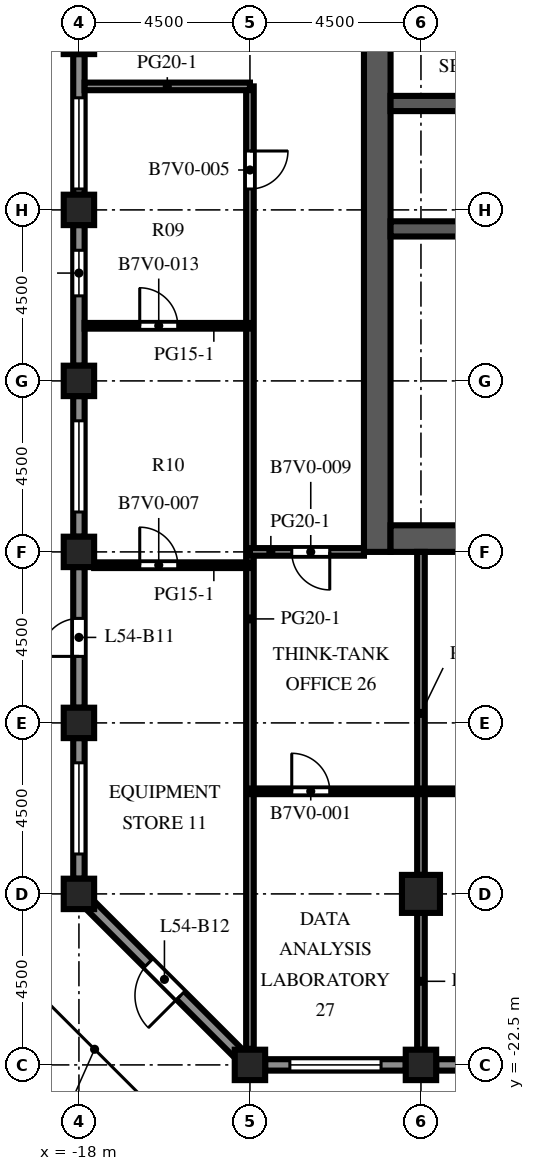
"""IFC4 building model, lengths in metres.
Left out: names, types, materials, properties, quantities, classifications, styles, units other than length and angle.
Written with IfcOpenShell. Run it as: python <this file> out.ifc"""

import sys

from ifc_helpers import new_model, si_unit, direction, frame, frame_2d, origin, origin_2d, place, context, subcontext, project, spatial, rectangle, extrude, element, fill, save


model = new_model("IFC4")
c1 = context("Model", 3, precision=1e-05, world=origin(), true_north=direction((0.0, 1.0)))
c2 = subcontext(c1, "Body", "Model", "MODEL_VIEW")
j1 = project(units=[si_unit("LENGTHUNIT", "METRE"), si_unit("PLANEANGLEUNIT", "RADIAN")], contexts=[c1])
p1 = place(None, origin())
s1 = spatial("IfcSite", under=j1, at=p1, CompositionType="ELEMENT")
p2 = place(p1, origin())
s2 = spatial("IfcBuilding", under=s1, at=p2, CompositionType="ELEMENT")
p3 = place(p2, frame((0.0, 0.0, 239.8)))
s3 = spatial("IfcBuildingStorey", under=s2, at=p3, CompositionType="ELEMENT", Elevation=239.8)
for number, where, z_axis, x_axis in (
    (1, (-18.0, -18.0, 0.0), (0.0, 0.0, 1.0), (1.0, 0.0, 0.0)),
    (2, (-18.0, -13.5, 0.0), (0.0, 0.0, 1.0), (1.0, 0.0, 0.0)),
    (3, (-18.0, -9.0, 0.0), (0.0, 0.0, 1.0), (1.0, 0.0, 0.0)),
    (4, (-18.0, -4.5, 0.0), (0.0, 0.0, 1.0), (1.0, 0.0, 0.0)),
    (5, (-18.0, 0.0, 0.0), (0.0, 0.0, 1.0), (1.0, 0.0, 0.0)),
    (6, (-18.0, 4.5, 0.0), (0.0, 0.0, 1.0), (1.0, 0.0, 0.0)),
    (7, (-13.5, -22.5, 0.0), (0.0, 0.0, 1.0), (1.0, 0.0, 0.0)),
    (8, (-9.0, -22.5, 0.0), (0.0, 0.0, 1.0), (1.0, 0.0, 0.0)),
):
    element("IfcColumn", number, at=place(p3, frame(where, z_axis=z_axis, x_axis=x_axis)), inside=s3, PredefinedType="COLUMN", context=c2, shape_type="SweptSolid", body=[
        extrude(rectangle(XDim=0.8, YDim=0.8, at=origin_2d()), origin(), (0.0, 0.0, 1.0), 4.1),
    ])
p4 = place(p3, frame((-9.0, -18.0, 0.0), z_axis=(0.0, 0.0, 1.0), x_axis=(1.0, 0.0, 0.0)))
e9 = element("IfcColumn", 9, at=p4, inside=s3, PredefinedType="COLUMN", context=c2, shape_type="SweptSolid", body=[
    extrude(rectangle(XDim=1.0, YDim=1.0, at=origin_2d()), origin(), (0.0, 0.0, 1.0), 4.1),
])
p5 = place(p3, frame((-10.15, -9.0, 0.0), z_axis=(0.0, 0.0, 1.0), x_axis=(0.0, 1.0, 0.0)))
e10 = element("IfcWall", 10, at=p5, inside=s3, PredefinedType="SHEAR", context=c2, shape_type="SweptSolid", body=[
    extrude(rectangle(XDim=27.5, YDim=0.7, at=frame_2d((13.75, 0.0))), origin(), (0.0, 0.0, 1.0), 4.1),
])
p6 = place(p5, frame((12.55, 0.0, 0.0)))
e11 = element("IfcOpeningElement", 11, at=p6, cuts=e10, PredefinedType="OPENING", context=c2, shape_type="SweptSolid", body=[
    extrude(rectangle(XDim=2.4, YDim=2.4, at=frame_2d((1.2, 1.2))), frame((0.0, 0.36, 0.0), z_axis=(0.0, -1.0, 0.0), x_axis=(1.0, 0.0, 0.0)), (0.0, 0.0, 1.0), 0.72),
])
p7 = place(p5, frame((6.825, 0.0, 0.0)))
e12 = element("IfcOpeningElement", 12, at=p7, cuts=e10, PredefinedType="OPENING", context=c2, shape_type="SweptSolid", body=[
    extrude(rectangle(XDim=1.2, YDim=2.1, at=frame_2d((0.6, 1.05))), frame((0.0, 0.36, 0.0), z_axis=(0.0, -1.0, 0.0), x_axis=(1.0, 0.0, 0.0)), (0.0, 0.0, 1.0), 0.72),
])
p8 = place(p5, frame((19.475, 0.0, 0.0)))
e13 = element("IfcOpeningElement", 13, at=p8, cuts=e10, PredefinedType="OPENING", context=c2, shape_type="SweptSolid", body=[
    extrude(rectangle(XDim=1.2, YDim=2.1, at=frame_2d((0.6, 1.05))), frame((0.0, 0.36, 0.0), z_axis=(0.0, -1.0, 0.0), x_axis=(1.0, 0.0, 0.0)), (0.0, 0.0, 1.0), 0.72),
])
p9 = place(p3, frame((-9.8, -8.65, 0.0), z_axis=(0.0, 0.0, 1.0), x_axis=(1.0, 0.0, 0.0)))
e14 = element("IfcWall", 14, at=p9, inside=s3, PredefinedType="SHEAR", context=c2, shape_type="SweptSolid", body=[
    extrude(rectangle(XDim=10.6, YDim=0.7, at=frame_2d((5.3, 0.0))), origin(), (0.0, 0.0, 1.0), 4.1),
])
p10 = place(p3, frame((-9.8, -0.5, 0.0), z_axis=(0.0, 0.0, 1.0), x_axis=(1.0, 0.0, 0.0)))
e15 = element("IfcWall", 15, at=p10, inside=s3, PredefinedType="SHEAR", context=c2, shape_type="SweptSolid", body=[
    extrude(rectangle(XDim=10.6, YDim=0.4, at=frame_2d((5.3, 0.0))), origin(), (0.0, 0.0, 1.0), 4.1),
])
p11 = place(p3, frame((-9.8, 2.8, 0.0), z_axis=(0.0, 0.0, 1.0), x_axis=(1.0, 0.0, 0.0)))
e16 = element("IfcWall", 16, at=p11, inside=s3, PredefinedType="SHEAR", context=c2, shape_type="SweptSolid", body=[
    extrude(rectangle(XDim=10.6, YDim=0.4, at=frame_2d((5.3, 0.0))), origin(), (0.0, 0.0, 1.0), 4.1),
])
p12 = place(p11, frame((0.688, 0.0, 0.0)))
e17 = element("IfcOpeningElement", 17, at=p12, cuts=e16, PredefinedType="OPENING", context=c2, shape_type="SweptSolid", body=[
    extrude(rectangle(XDim=1.1, YDim=2.1, at=frame_2d((0.55, 1.05))), frame((0.0, 0.21, 0.0), z_axis=(0.0, -1.0, 0.0), x_axis=(1.0, 0.0, 0.0)), (0.0, 0.0, 1.0), 0.42),
])
p13 = place(p11, frame((3.438, 0.0, 0.0)))
e18 = element("IfcOpeningElement", 18, at=p13, cuts=e16, PredefinedType="OPENING", context=c2, shape_type="SweptSolid", body=[
    extrude(rectangle(XDim=1.1, YDim=2.1, at=frame_2d((0.55, 1.05))), frame((0.0, 0.21, 0.0), z_axis=(0.0, -1.0, 0.0), x_axis=(1.0, 0.0, 0.0)), (0.0, 0.0, 1.0), 0.42),
])
p14 = place(p11, frame((6.113, 0.0, 0.0)))
e19 = element("IfcOpeningElement", 19, at=p14, cuts=e16, PredefinedType="OPENING", context=c2, shape_type="SweptSolid", body=[
    extrude(rectangle(XDim=1.0, YDim=2.1, at=frame_2d((0.5, 1.05))), frame((0.0, 0.21, 0.0), z_axis=(0.0, -1.0, 0.0), x_axis=(1.0, 0.0, 0.0)), (0.0, 0.0, 1.0), 0.42),
])
p15 = place(p11, frame((8.863, 0.0, 0.0)))
e20 = element("IfcOpeningElement", 20, at=p15, cuts=e16, PredefinedType="OPENING", context=c2, shape_type="SweptSolid", body=[
    extrude(rectangle(XDim=1.0, YDim=2.1, at=frame_2d((0.5, 1.05))), frame((0.0, 0.21, 0.0), z_axis=(0.0, -1.0, 0.0), x_axis=(1.0, 0.0, 0.0)), (0.0, 0.0, 1.0), 0.42),
])
p16 = place(p3, frame((-9.4, -22.5, 0.0), z_axis=(0.0, 0.0, 1.0), x_axis=(-1.0, 0.0, 0.0)))
e21 = element("IfcWall", 21, at=p16, inside=s3, PredefinedType="SOLIDWALL", context=c2, shape_type="SweptSolid", body=[
    extrude(rectangle(XDim=3.7, YDim=0.3, at=frame_2d((1.85, 0.0))), origin(), (0.0, 0.0, 1.0), 2.85),
])
p17 = place(p16, frame((0.65, 0.0, 0.8)))
e22 = element("IfcOpeningElement", 22, at=p17, cuts=e21, PredefinedType="OPENING", context=c2, shape_type="SweptSolid", body=[
    extrude(rectangle(XDim=2.4, YDim=1.7, at=frame_2d((1.2, 0.85))), frame((0.0, 0.16, 0.0), z_axis=(0.0, -1.0, 0.0), x_axis=(1.0, 0.0, 0.0)), (0.0, 0.0, 1.0), 0.32),
])
p18 = place(p3, frame((-4.9, -22.5, 0.0), z_axis=(0.0, 0.0, 1.0), x_axis=(-1.0, 0.0, 0.0)))
e23 = element("IfcWall", 23, at=p18, inside=s3, PredefinedType="SOLIDWALL", context=c2, shape_type="SweptSolid", body=[
    extrude(rectangle(XDim=3.7, YDim=0.3, at=frame_2d((1.85, 0.0))), origin(), (0.0, 0.0, 1.0), 2.85),
])
p19 = place(p18, frame((1.35, 0.0, 0.0)))
e24 = element("IfcOpeningElement", 24, at=p19, cuts=e23, PredefinedType="OPENING", context=c2, shape_type="SweptSolid", body=[
    extrude(rectangle(XDim=1.0, YDim=2.2, at=frame_2d((0.5, 1.1))), frame((0.0, 0.16, 0.0), z_axis=(0.0, -1.0, 0.0), x_axis=(1.0, 0.0, 0.0)), (0.0, 0.0, 1.0), 0.32),
])
p20 = place(p3, frame((-18.0, 0.4, 0.0), z_axis=(0.0, 0.0, 1.0), x_axis=(0.0, 1.0, 0.0)))
e25 = element("IfcWall", 25, at=p20, inside=s3, PredefinedType="SOLIDWALL", context=c2, shape_type="SweptSolid", body=[
    extrude(rectangle(XDim=3.7, YDim=0.3, at=frame_2d((1.85, 0.0))), origin(), (0.0, 0.0, 1.0), 2.85),
])
p21 = place(p20, frame((0.15, 0.0, 0.8)))
e26 = element("IfcOpeningElement", 26, at=p21, cuts=e25, PredefinedType="OPENING", context=c2, shape_type="SweptSolid", body=[
    extrude(rectangle(XDim=2.4, YDim=1.7, at=frame_2d((1.2, 0.85))), frame((0.0, 0.16, 0.0), z_axis=(0.0, -1.0, 0.0), x_axis=(1.0, 0.0, 0.0)), (0.0, 0.0, 1.0), 0.32),
])
p22 = place(p3, frame((-18.0, -4.1, 0.0), z_axis=(0.0, 0.0, 1.0), x_axis=(0.0, 1.0, 0.0)))
e27 = element("IfcWall", 27, at=p22, inside=s3, PredefinedType="SOLIDWALL", context=c2, shape_type="SweptSolid", body=[
    extrude(rectangle(XDim=3.7, YDim=0.3, at=frame_2d((1.85, 0.0))), origin(), (0.0, 0.0, 1.0), 2.85),
])
p23 = place(p22, frame((1.837, 0.0, 0.8)))
e28 = element("IfcOpeningElement", 28, at=p23, cuts=e27, PredefinedType="OPENING", context=c2, shape_type="SweptSolid", body=[
    extrude(rectangle(XDim=1.2, YDim=1.7, at=frame_2d((0.6, 0.85))), frame((0.0, 0.16, 0.0), z_axis=(0.0, -1.0, 0.0), x_axis=(1.0, 0.0, 0.0)), (0.0, 0.0, 1.0), 0.32),
])
p24 = place(p3, frame((-18.0, -8.6, 0.0), z_axis=(0.0, 0.0, 1.0), x_axis=(0.0, 1.0, 0.0)))
e29 = element("IfcWall", 29, at=p24, inside=s3, PredefinedType="SOLIDWALL", context=c2, shape_type="SweptSolid", body=[
    extrude(rectangle(XDim=3.7, YDim=0.3, at=frame_2d((1.85, 0.0))), origin(), (0.0, 0.0, 1.0), 2.85),
])
p25 = place(p24, frame((0.65, 0.0, 0.8)))
e30 = element("IfcOpeningElement", 30, at=p25, cuts=e29, PredefinedType="OPENING", context=c2, shape_type="SweptSolid", body=[
    extrude(rectangle(XDim=2.4, YDim=1.7, at=frame_2d((1.2, 0.85))), frame((0.0, 0.16, 0.0), z_axis=(0.0, -1.0, 0.0), x_axis=(1.0, 0.0, 0.0)), (0.0, 0.0, 1.0), 0.32),
])
p26 = place(p3, frame((-18.0, -13.1, 0.0), z_axis=(0.0, 0.0, 1.0), x_axis=(0.0, 1.0, 0.0)))
e31 = element("IfcWall", 31, at=p26, inside=s3, PredefinedType="SOLIDWALL", context=c2, shape_type="SweptSolid", body=[
    extrude(rectangle(XDim=3.7, YDim=0.3, at=frame_2d((1.85, 0.0))), origin(), (0.0, 0.0, 1.0), 2.85),
])
p27 = place(p26, frame((1.35, 0.0, 0.0)))
e32 = element("IfcOpeningElement", 32, at=p27, cuts=e31, PredefinedType="OPENING", context=c2, shape_type="SweptSolid", body=[
    extrude(rectangle(XDim=1.0, YDim=2.2, at=frame_2d((0.5, 1.1))), frame((0.0, 0.16, 0.0), z_axis=(0.0, -1.0, 0.0), x_axis=(1.0, 0.0, 0.0)), (0.0, 0.0, 1.0), 0.32),
])
p28 = place(p3, frame((-18.0, -17.6, 0.0), z_axis=(0.0, 0.0, 1.0), x_axis=(0.0, 1.0, 0.0)))
e33 = element("IfcWall", 33, at=p28, inside=s3, PredefinedType="SOLIDWALL", context=c2, shape_type="SweptSolid", body=[
    extrude(rectangle(XDim=3.7, YDim=0.3, at=frame_2d((1.85, 0.0))), origin(), (0.0, 0.0, 1.0), 2.85),
])
p29 = place(p28, frame((0.65, 0.0, 0.8)))
e34 = element("IfcOpeningElement", 34, at=p29, cuts=e33, PredefinedType="OPENING", context=c2, shape_type="SweptSolid", body=[
    extrude(rectangle(XDim=2.4, YDim=1.7, at=frame_2d((1.2, 0.85))), frame((0.0, 0.16, 0.0), z_axis=(0.0, -1.0, 0.0), x_axis=(1.0, 0.0, 0.0)), (0.0, 0.0, 1.0), 0.32),
])
p30 = place(p3, frame((-13.794, -22.206, 0.0), z_axis=(0.0, 0.0, 1.0), x_axis=(-0.707106781187, 0.707106781187, 0.0)))
e35 = element("IfcWall", 35, at=p30, inside=s3, PredefinedType="SOLIDWALL", context=c2, shape_type="SweptSolid", body=[
    extrude(rectangle(XDim=5.532, YDim=0.3, at=frame_2d((2.766, 0.0))), origin(), (0.0, 0.0, 1.0), 2.85),
])
p31 = place(p30, frame((2.166, 0.0, 0.0)))
e36 = element("IfcOpeningElement", 36, at=p31, cuts=e35, PredefinedType="OPENING", context=c2, shape_type="SweptSolid", body=[
    extrude(rectangle(XDim=1.2, YDim=2.2, at=frame_2d((0.6, 1.1))), frame((0.0, 0.16, 0.0), z_axis=(0.0, -1.0, 0.0), x_axis=(1.0, 0.0, 0.0)), (0.0, 0.0, 1.0), 0.32),
])
p32 = place(p3, frame((-13.5, -22.077, 0.0), z_axis=(0.0, 0.0, 1.0), x_axis=(0.0, 1.0, 0.0)))
e37 = element("IfcWall", 37, at=p32, inside=s3, PredefinedType="PARTITIONING", context=c2, shape_type="SweptSolid", body=[
    extrude(rectangle(XDim=25.327, YDim=0.2, at=frame_2d((12.664, 0.0))), origin(), (0.0, 0.0, 1.0), 3.65),
])
p33 = place(p32, frame((22.627, 0.0, 0.0)))
e38 = element("IfcOpeningElement", 38, at=p33, cuts=e37, PredefinedType="OPENING", context=c2, shape_type="SweptSolid", body=[
    extrude(rectangle(XDim=1.0, YDim=2.1, at=frame_2d((0.5, 1.05))), frame((0.0, 0.11, 0.0), z_axis=(0.0, -1.0, 0.0), x_axis=(1.0, 0.0, 0.0)), (0.0, 0.0, 1.0), 0.22),
])
p34 = place(p3, frame((-9.0, -22.1, 0.0), z_axis=(0.0, 0.0, 1.0), x_axis=(0.0, 1.0, 0.0)))
e39 = element("IfcWall", 39, at=p34, inside=s3, PredefinedType="PARTITIONING", context=c2, shape_type="SweptSolid", body=[
    extrude(rectangle(XDim=3.6, YDim=0.2, at=frame_2d((1.8, 0.0))), origin(), (0.0, 0.0, 1.0), 3.65),
])
p35 = place(p3, frame((-9.0, -17.5, 0.0), z_axis=(0.0, 0.0, 1.0), x_axis=(0.0, 1.0, 0.0)))
e40 = element("IfcWall", 40, at=p35, inside=s3, PredefinedType="PARTITIONING", context=c2, shape_type="SweptSolid", body=[
    extrude(rectangle(XDim=8.5, YDim=0.2, at=frame_2d((4.25, 0.0))), origin(), (0.0, 0.0, 1.0), 3.65),
])
p36 = place(p3, frame((21.0, -15.3, 0.0), z_axis=(0.0, 0.0, 1.0), x_axis=(-1.0, 0.0, 0.0)))
e41 = element("IfcWall", 41, at=p36, inside=s3, PredefinedType="PARTITIONING", context=c2, shape_type="SweptSolid", body=[
    extrude(rectangle(XDim=34.5, YDim=0.15, at=frame_2d((17.25, 0.0))), origin(), (0.0, 0.0, 1.0), 3.65),
])
p37 = place(p36, frame((32.4, 0.0, 0.0)))
e42 = element("IfcOpeningElement", 42, at=p37, cuts=e41, PredefinedType="OPENING", context=c2, shape_type="SweptSolid", body=[
    extrude(rectangle(XDim=1.0, YDim=2.1, at=frame_2d((0.5, 1.05))), frame((0.0, 0.085, 0.0), z_axis=(0.0, -1.0, 0.0), x_axis=(1.0, 0.0, 0.0)), (0.0, 0.0, 1.0), 0.17),
])
p38 = place(p36, frame((23.4, 0.0, 0.0)))
e43 = element("IfcOpeningElement", 43, at=p38, cuts=e41, PredefinedType="OPENING", context=c2, shape_type="SweptSolid", body=[
    extrude(rectangle(XDim=1.0, YDim=2.1, at=frame_2d((0.5, 1.05))), frame((0.0, 0.085, 0.0), z_axis=(0.0, -1.0, 0.0), x_axis=(1.0, 0.0, 0.0)), (0.0, 0.0, 1.0), 0.17),
])
p39 = place(p36, frame((11.4, 0.0, 0.0)))
e44 = element("IfcOpeningElement", 44, at=p39, cuts=e41, PredefinedType="OPENING", context=c2, shape_type="SweptSolid", body=[
    extrude(rectangle(XDim=1.0, YDim=2.1, at=frame_2d((0.5, 1.05))), frame((0.0, 0.085, 0.0), z_axis=(0.0, -1.0, 0.0), x_axis=(1.0, 0.0, 0.0)), (0.0, 0.0, 1.0), 0.17),
])
p40 = place(p36, frame((2.4, 0.0, 0.0)))
e45 = element("IfcOpeningElement", 45, at=p40, cuts=e41, PredefinedType="OPENING", context=c2, shape_type="SweptSolid", body=[
    extrude(rectangle(XDim=1.0, YDim=2.1, at=frame_2d((0.5, 1.05))), frame((0.0, 0.085, 0.0), z_axis=(0.0, -1.0, 0.0), x_axis=(1.0, 0.0, 0.0)), (0.0, 0.0, 1.0), 0.17),
])
p41 = place(p3, frame((-13.5, -9.35, 0.0), z_axis=(0.0, 0.0, 1.0), x_axis=(-1.0, 0.0, 0.0)))
e46 = element("IfcWall", 46, at=p41, inside=s3, PredefinedType="PARTITIONING", context=c2, shape_type="SweptSolid", body=[
    extrude(rectangle(XDim=4.1, YDim=0.15, at=frame_2d((2.05, 0.0))), origin(), (0.0, 0.0, 1.0), 3.65),
])
p42 = place(p41, frame((1.9, 0.0, 0.0)))
e47 = element("IfcOpeningElement", 47, at=p42, cuts=e46, PredefinedType="OPENING", context=c2, shape_type="SweptSolid", body=[
    extrude(rectangle(XDim=1.0, YDim=2.1, at=frame_2d((0.5, 1.05))), frame((0.0, 0.085, 0.0), z_axis=(0.0, -1.0, 0.0), x_axis=(1.0, 0.0, 0.0)), (0.0, 0.0, 1.0), 0.17),
])
p43 = place(p3, frame((-10.5, -9.0, 0.0), z_axis=(0.0, 0.0, 1.0), x_axis=(-1.0, 0.0, 0.0)))
e48 = element("IfcWall", 48, at=p43, inside=s3, PredefinedType="PARTITIONING", context=c2, shape_type="SweptSolid", body=[
    extrude(rectangle(XDim=3.0, YDim=0.2, at=frame_2d((1.5, 0.0))), origin(), (0.0, 0.0, 1.0), 3.65),
])
p44 = place(p43, frame((0.9, 0.0, 0.0)))
e49 = element("IfcOpeningElement", 49, at=p44, cuts=e48, PredefinedType="OPENING", context=c2, shape_type="SweptSolid", body=[
    extrude(rectangle(XDim=1.0, YDim=2.1, at=frame_2d((0.5, 1.05))), frame((0.0, 0.11, 0.0), z_axis=(0.0, -1.0, 0.0), x_axis=(1.0, 0.0, 0.0)), (0.0, 0.0, 1.0), 0.22),
])
p45 = place(p3, frame((-13.5, -3.05, 0.0), z_axis=(0.0, 0.0, 1.0), x_axis=(-1.0, 0.0, 0.0)))
e50 = element("IfcWall", 50, at=p45, inside=s3, PredefinedType="PARTITIONING", context=c2, shape_type="SweptSolid", body=[
    extrude(rectangle(XDim=4.35, YDim=0.15, at=frame_2d((2.175, 0.0))), origin(), (0.0, 0.0, 1.0), 3.65),
])
p46 = place(p45, frame((1.9, 0.0, 0.0)))
e51 = element("IfcOpeningElement", 51, at=p46, cuts=e50, PredefinedType="OPENING", context=c2, shape_type="SweptSolid", body=[
    extrude(rectangle(XDim=1.0, YDim=2.1, at=frame_2d((0.5, 1.05))), frame((0.0, 0.085, 0.0), z_axis=(0.0, -1.0, 0.0), x_axis=(1.0, 0.0, 0.0)), (0.0, 0.0, 1.0), 0.17),
])
p47 = place(p3, frame((-17.85, 3.25, 0.0), z_axis=(0.0, 0.0, 1.0), x_axis=(1.0, 0.0, 0.0)))
e52 = element("IfcWall", 52, at=p47, inside=s3, PredefinedType="PARTITIONING", context=c2, shape_type="SweptSolid", body=[
    extrude(rectangle(XDim=4.35, YDim=0.2, at=frame_2d((2.175, 0.0))), origin(), (0.0, 0.0, 1.0), 3.65),
])
p48 = place(p17, origin())
e53 = element("IfcWindow", 53, at=p48, inside=s3, PartitioningType="SINGLE_PANEL", PredefinedType="WINDOW", context=c2, shape_type="SweptSolid", body=[
    extrude(rectangle(XDim=2.4, YDim=1.7, at=frame_2d((1.2, 0.85))), frame((0.0, 0.03, 0.0), z_axis=(0.0, -1.0, 0.0), x_axis=(1.0, 0.0, 0.0)), (0.0, 0.0, 1.0), 0.06),
])
fill(e22, e53)
p49 = place(p21, origin())
e54 = element("IfcWindow", 54, at=p49, inside=s3, PartitioningType="SINGLE_PANEL", PredefinedType="WINDOW", context=c2, shape_type="SweptSolid", body=[
    extrude(rectangle(XDim=2.4, YDim=1.7, at=frame_2d((1.2, 0.85))), frame((0.0, 0.03, 0.0), z_axis=(0.0, -1.0, 0.0), x_axis=(1.0, 0.0, 0.0)), (0.0, 0.0, 1.0), 0.06),
])
fill(e26, e54)
p50 = place(p23, origin())
e55 = element("IfcWindow", 55, at=p50, inside=s3, PartitioningType="SINGLE_PANEL", PredefinedType="WINDOW", context=c2, shape_type="SweptSolid", body=[
    extrude(rectangle(XDim=1.2, YDim=1.7, at=frame_2d((0.6, 0.85))), frame((0.0, 0.03, 0.0), z_axis=(0.0, -1.0, 0.0), x_axis=(1.0, 0.0, 0.0)), (0.0, 0.0, 1.0), 0.06),
])
fill(e28, e55)
p51 = place(p25, origin())
e56 = element("IfcWindow", 56, at=p51, inside=s3, PartitioningType="SINGLE_PANEL", PredefinedType="WINDOW", context=c2, shape_type="SweptSolid", body=[
    extrude(rectangle(XDim=2.4, YDim=1.7, at=frame_2d((1.2, 0.85))), frame((0.0, 0.03, 0.0), z_axis=(0.0, -1.0, 0.0), x_axis=(1.0, 0.0, 0.0)), (0.0, 0.0, 1.0), 0.06),
])
fill(e30, e56)
p52 = place(p27, origin())
e57 = element("IfcDoor", 57, at=p52, inside=s3, OperationType="SINGLE_SWING_LEFT", PredefinedType="DOOR", context=c2, shape_type="SweptSolid", body=[
    extrude(rectangle(XDim=1.0, YDim=2.2, at=frame_2d((0.5, 1.1))), frame((0.0, 0.025, 0.0), z_axis=(0.0, -1.0, 0.0), x_axis=(1.0, 0.0, 0.0)), (0.0, 0.0, 1.0), 0.05),
])
fill(e32, e57)
p53 = place(p29, origin())
e58 = element("IfcWindow", 58, at=p53, inside=s3, PartitioningType="SINGLE_PANEL", PredefinedType="WINDOW", context=c2, shape_type="SweptSolid", body=[
    extrude(rectangle(XDim=2.4, YDim=1.7, at=frame_2d((1.2, 0.85))), frame((0.0, 0.03, 0.0), z_axis=(0.0, -1.0, 0.0), x_axis=(1.0, 0.0, 0.0)), (0.0, 0.0, 1.0), 0.06),
])
fill(e34, e58)
p54 = place(p31, origin())
e59 = element("IfcDoor", 59, at=p54, inside=s3, OperationType="SINGLE_SWING_LEFT", PredefinedType="DOOR", context=c2, shape_type="SweptSolid", body=[
    extrude(rectangle(XDim=1.2, YDim=2.2, at=frame_2d((0.6, 1.1))), frame((0.0, 0.025, 0.0), z_axis=(0.0, -1.0, 0.0), x_axis=(1.0, 0.0, 0.0)), (0.0, 0.0, 1.0), 0.05),
])
fill(e36, e59)
p55 = place(p12, origin())
e60 = element("IfcDoor", 60, at=p55, inside=s3, OperationType="DOUBLE_DOOR_SLIDING", PredefinedType="DOOR", context=c2, shape_type="SweptSolid", body=[
    extrude(rectangle(XDim=1.1, YDim=2.1, at=frame_2d((0.55, 1.05))), frame((0.0, 0.025, 0.0), z_axis=(0.0, -1.0, 0.0), x_axis=(1.0, 0.0, 0.0)), (0.0, 0.0, 1.0), 0.05),
])
fill(e17, e60)
p56 = place(p6, origin())
e61 = element("IfcDoor", 61, at=p56, inside=s3, OperationType="DOUBLE_DOOR_DOUBLE_SWING", PredefinedType="DOOR", context=c2, shape_type="SweptSolid", body=[
    extrude(rectangle(XDim=2.4, YDim=2.4, at=frame_2d((1.2, 1.2))), frame((0.0, 0.025, 0.0), z_axis=(0.0, -1.0, 0.0), x_axis=(1.0, 0.0, 0.0)), (0.0, 0.0, 1.0), 0.05),
])
fill(e11, e61)
p57 = place(p7, origin())
e62 = element("IfcDoor", 62, at=p57, inside=s3, OperationType="SINGLE_SWING_LEFT", PredefinedType="DOOR", context=c2, shape_type="SweptSolid", body=[
    extrude(rectangle(XDim=1.2, YDim=2.1, at=frame_2d((0.6, 1.05))), frame((0.0, 0.025, 0.0), z_axis=(0.0, -1.0, 0.0), x_axis=(1.0, 0.0, 0.0)), (0.0, 0.0, 1.0), 0.05),
])
fill(e12, e62)
p58 = place(p37, origin())
e63 = element("IfcDoor", 63, at=p58, inside=s3, OperationType="SINGLE_SWING_RIGHT", PredefinedType="DOOR", context=c2, shape_type="SweptSolid", body=[
    extrude(rectangle(XDim=1.0, YDim=2.1, at=frame_2d((0.5, 1.05))), frame((0.0, 0.025, 0.0), z_axis=(0.0, -1.0, 0.0), x_axis=(1.0, 0.0, 0.0)), (0.0, 0.0, 1.0), 0.05),
])
fill(e42, e63)
p59 = place(p33, origin())
e64 = element("IfcDoor", 64, at=p59, inside=s3, OperationType="SINGLE_SWING_RIGHT", PredefinedType="DOOR", context=c2, shape_type="SweptSolid", body=[
    extrude(rectangle(XDim=1.0, YDim=2.1, at=frame_2d((0.5, 1.05))), frame((0.0, 0.025, 0.0), z_axis=(0.0, -1.0, 0.0), x_axis=(1.0, 0.0, 0.0)), (0.0, 0.0, 1.0), 0.05),
])
fill(e38, e64)
p60 = place(p42, origin())
e65 = element("IfcDoor", 65, at=p60, inside=s3, OperationType="SINGLE_SWING_RIGHT", PredefinedType="DOOR", context=c2, shape_type="SweptSolid", body=[
    extrude(rectangle(XDim=1.0, YDim=2.1, at=frame_2d((0.5, 1.05))), frame((0.0, 0.025, 0.0), z_axis=(0.0, -1.0, 0.0), x_axis=(1.0, 0.0, 0.0)), (0.0, 0.0, 1.0), 0.05),
])
fill(e47, e65)
p61 = place(p44, origin())
e66 = element("IfcDoor", 66, at=p61, inside=s3, OperationType="SINGLE_SWING_LEFT", PredefinedType="DOOR", context=c2, shape_type="SweptSolid", body=[
    extrude(rectangle(XDim=1.0, YDim=2.1, at=frame_2d((0.5, 1.05))), frame((0.0, 0.025, 0.0), z_axis=(0.0, -1.0, 0.0), x_axis=(1.0, 0.0, 0.0)), (0.0, 0.0, 1.0), 0.05),
])
fill(e49, e66)
p62 = place(p46, origin())
e67 = element("IfcDoor", 67, at=p62, inside=s3, OperationType="SINGLE_SWING_RIGHT", PredefinedType="DOOR", context=c2, shape_type="SweptSolid", body=[
    extrude(rectangle(XDim=1.0, YDim=2.1, at=frame_2d((0.5, 1.05))), frame((0.0, 0.025, 0.0), z_axis=(0.0, -1.0, 0.0), x_axis=(1.0, 0.0, 0.0)), (0.0, 0.0, 1.0), 0.05),
])
fill(e51, e67)
save(model, sys.argv[1])
